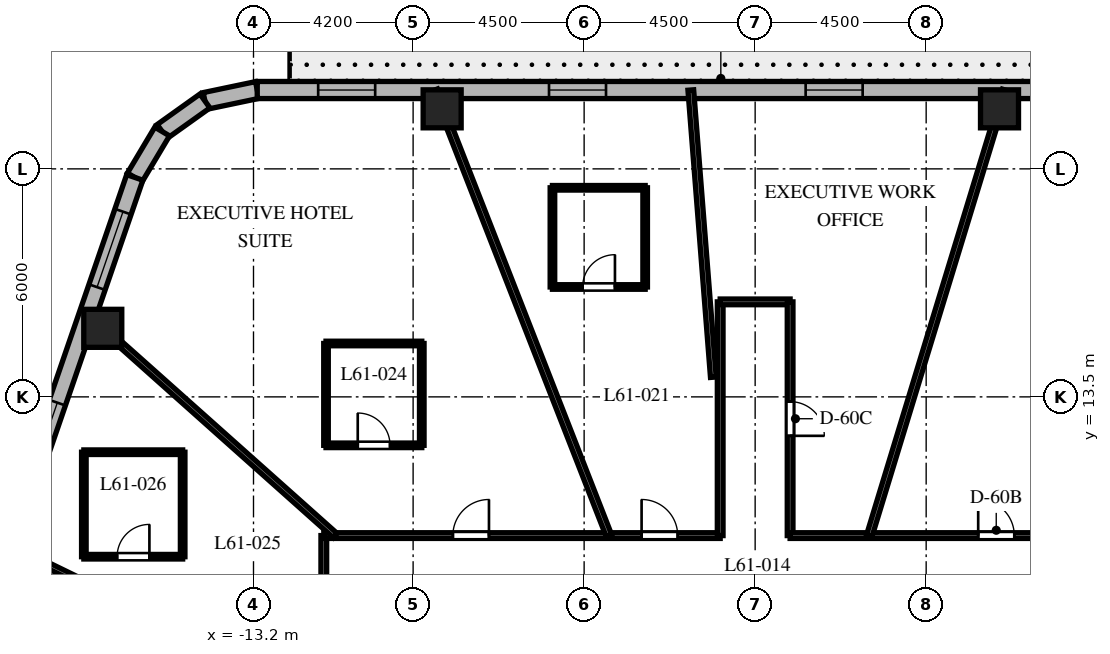
"""IFC4 building model, lengths in metres.
Left out: names, types, materials, properties, quantities, classifications, styles, units other than length and angle.
Written with IfcOpenShell. Run it as: python <this file> out.ifc"""

import sys

from ifc_helpers import new_model, si_unit, direction, frame, frame_2d, origin, origin_2d, place, context, subcontext, project, spatial, rectangle, extrude, element, fill, save


model = new_model("IFC4")
c1 = context("Model", 3, precision=1e-05, world=origin(), true_north=direction((0.0, 1.0)))
c2 = subcontext(c1, "Body", "Model", "MODEL_VIEW")
j1 = project(units=[si_unit("LENGTHUNIT", "METRE"), si_unit("PLANEANGLEUNIT", "RADIAN")], contexts=[c1])
p1 = place(None, origin())
s1 = spatial("IfcSite", under=j1, at=p1, CompositionType="ELEMENT")
p2 = place(p1, origin())
s2 = spatial("IfcBuilding", under=s1, at=p2, CompositionType="ELEMENT")
p3 = place(p2, frame((0.0, 0.0, 244.5)))
s3 = spatial("IfcBuildingStorey", under=s2, at=p3, CompositionType="ELEMENT", Elevation=244.5)
for number, where, z_axis, x_axis in (
    (1, (6.43, 21.08, 0.0), (0.0, 0.0, 1.0), (1.0, 0.0, 0.0)),
    (2, (-8.236, 21.08, 0.0), (0.0, 0.0, 1.0), (1.0, 0.0, 0.0)),
    (3, (-17.166, 15.304, 0.0), (0.0, 0.0, 1.0), (1.0, 0.0, 0.0)),
):
    element("IfcColumn", number, at=place(p3, frame(where, z_axis=z_axis, x_axis=x_axis)), inside=s3, PredefinedType="COLUMN", context=c2, shape_type="SweptSolid", body=[
        extrude(rectangle(XDim=1.0, YDim=1.0, at=origin_2d()), origin(), (0.0, 0.0, 1.0), 3.8),
    ])
p4 = place(p3, frame((-13.102, 21.575, 0.0), z_axis=(0.0, 0.0, 1.0), x_axis=(-0.978757421505, -0.205021730188, 0.0)))
e4 = element("IfcWall", 4, at=p4, inside=s3, PredefinedType="SOLIDWALL", context=c2, shape_type="SweptSolid", body=[
    extrude(rectangle(XDim=1.406, YDim=0.45, at=frame_2d((0.703, 0.0))), origin(), (0.0, 0.0, 1.0), 3.5),
])
p5 = place(p3, frame((-14.478, 21.287, 0.0), z_axis=(0.0, 0.0, 1.0), x_axis=(-0.813888518617, -0.58102106611, 0.0)))
e5 = element("IfcWall", 5, at=p5, inside=s3, PredefinedType="SOLIDWALL", context=c2, shape_type="SweptSolid", body=[
    extrude(rectangle(XDim=1.383, YDim=0.45, at=frame_2d((0.691, 0.0))), origin(), (0.0, 0.0, 1.0), 3.5),
])
p6 = place(p3, frame((-15.604, 20.483, 0.0), z_axis=(0.0, 0.0, 1.0), x_axis=(-0.512222149036, -0.858852996756, 0.0)))
e6 = element("IfcWall", 6, at=p6, inside=s3, PredefinedType="SOLIDWALL", context=c2, shape_type="SweptSolid", body=[
    extrude(rectangle(XDim=1.406, YDim=0.45, at=frame_2d((0.703, 0.0))), origin(), (0.0, 0.0, 1.0), 3.5),
])
p7 = place(p3, frame((11.298, 21.575, 0.0), z_axis=(0.0, 0.0, 1.0), x_axis=(-1.0, 0.0, 0.0)))
e7 = element("IfcWall", 7, at=p7, inside=s3, PredefinedType="SOLIDWALL", context=c2, shape_type="SweptSolid", body=[
    extrude(rectangle(XDim=24.399, YDim=0.45, at=frame_2d((12.2, 0.0))), origin(), (0.0, 0.0, 1.0), 3.5),
])
p8 = place(p7, frame((2.55, 0.0, 0.0)))
e8 = element("IfcOpeningElement", 8, at=p8, cuts=e7, PredefinedType="OPENING", context=c2, shape_type="SweptSolid", body=[
    extrude(rectangle(XDim=0.95, YDim=2.15, at=frame_2d((0.475, 1.075))), frame((0.0, 0.235, 0.0), z_axis=(0.0, -1.0, 0.0), x_axis=(1.0, 0.0, 0.0)), (0.0, 0.0, 1.0), 0.47),
])
p9 = place(p7, frame((8.469, 0.0, 0.8)))
e9 = element("IfcOpeningElement", 9, at=p9, cuts=e7, PredefinedType="OPENING", context=c2, shape_type="SweptSolid", body=[
    extrude(rectangle(XDim=1.5, YDim=1.8, at=frame_2d((0.75, 0.9))), frame((0.0, 0.235, 0.0), z_axis=(0.0, -1.0, 0.0), x_axis=(1.0, 0.0, 0.0)), (0.0, 0.0, 1.0), 0.47),
])
p10 = place(p7, frame((15.222, 0.0, 0.8)))
e10 = element("IfcOpeningElement", 10, at=p10, cuts=e7, PredefinedType="OPENING", context=c2, shape_type="SweptSolid", body=[
    extrude(rectangle(XDim=1.5, YDim=1.8, at=frame_2d((0.75, 0.9))), frame((0.0, 0.235, 0.0), z_axis=(0.0, -1.0, 0.0), x_axis=(1.0, 0.0, 0.0)), (0.0, 0.0, 1.0), 0.47),
])
p11 = place(p7, frame((21.296, 0.0, 0.8)))
e11 = element("IfcOpeningElement", 11, at=p11, cuts=e7, PredefinedType="OPENING", context=c2, shape_type="SweptSolid", body=[
    extrude(rectangle(XDim=1.5, YDim=1.8, at=frame_2d((0.75, 0.9))), frame((0.0, 0.235, 0.0), z_axis=(0.0, -1.0, 0.0), x_axis=(1.0, 0.0, 0.0)), (0.0, 0.0, 1.0), 0.47),
])
p12 = place(p3, frame((-16.324, 19.275, 0.0), z_axis=(0.0, 0.0, 1.0), x_axis=(-0.325083142304, -0.945685439557, 0.0)))
e12 = element("IfcWall", 12, at=p12, inside=s3, PredefinedType="SOLIDWALL", context=c2, shape_type="SweptSolid", body=[
    extrude(rectangle(XDim=20.224, YDim=0.45, at=frame_2d((10.112, 0.0))), origin(), (0.0, 0.0, 1.0), 3.5),
])
p13 = place(p12, frame((0.953, 0.0, 0.8)))
e13 = element("IfcOpeningElement", 13, at=p13, cuts=e12, PredefinedType="OPENING", context=c2, shape_type="SweptSolid", body=[
    extrude(rectangle(XDim=2.1, YDim=1.85, at=frame_2d((1.05, 0.925))), frame((0.0, 0.235, 0.0), z_axis=(0.0, -1.0, 0.0), x_axis=(1.0, 0.0, 0.0)), (0.0, 0.0, 1.0), 0.47),
])
p14 = place(p12, frame((6.268, 0.0, 0.8)))
e14 = element("IfcOpeningElement", 14, at=p14, cuts=e12, PredefinedType="OPENING", context=c2, shape_type="SweptSolid", body=[
    extrude(rectangle(XDim=2.1, YDim=1.85, at=frame_2d((1.05, 0.925))), frame((0.0, 0.235, 0.0), z_axis=(0.0, -1.0, 0.0), x_axis=(1.0, 0.0, 0.0)), (0.0, 0.0, 1.0), 0.47),
])
p15 = place(p12, frame((11.95, 0.0, 0.8)))
e15 = element("IfcOpeningElement", 15, at=p15, cuts=e12, PredefinedType="OPENING", context=c2, shape_type="SweptSolid", body=[
    extrude(rectangle(XDim=2.1, YDim=1.85, at=frame_2d((1.05, 0.925))), frame((0.0, 0.235, 0.0), z_axis=(0.0, -1.0, 0.0), x_axis=(1.0, 0.0, 0.0)), (0.0, 0.0, 1.0), 0.47),
])
p16 = place(p12, frame((17.118, 0.0, 0.8)))
e16 = element("IfcOpeningElement", 16, at=p16, cuts=e12, PredefinedType="OPENING", context=c2, shape_type="SweptSolid", body=[
    extrude(rectangle(XDim=2.1, YDim=1.85, at=frame_2d((1.05, 0.925))), frame((0.0, 0.235, 0.0), z_axis=(0.0, -1.0, 0.0), x_axis=(1.0, 0.0, 0.0)), (0.0, 0.0, 1.0), 0.47),
])
p17 = place(p3, frame((-11.35, 4.4, 0.0), z_axis=(0.0, 0.0, 1.0), x_axis=(0.0, 1.0, 0.0)))
e17 = element("IfcWall", 17, at=p17, inside=s3, PredefinedType="PARTITIONING", context=c2, shape_type="SweptSolid", body=[
    extrude(rectangle(XDim=5.45, YDim=0.15, at=frame_2d((2.725, 0.0))), origin(), (0.0, 0.0, 1.0), 2.99),
])
p18 = place(p17, frame((2.694, 0.0, 0.0)))
e18 = element("IfcOpeningElement", 18, at=p18, cuts=e17, PredefinedType="OPENING", context=c2, shape_type="SweptSolid", body=[
    extrude(rectangle(XDim=0.95, YDim=2.03, at=frame_2d((0.475, 1.015))), frame((0.0, 0.085, 0.0), z_axis=(0.0, -1.0, 0.0), x_axis=(1.0, 0.0, 0.0)), (0.0, 0.0, 1.0), 0.17),
])
p19 = place(p3, frame((-11.35, 9.85, 0.0), z_axis=(0.0, 0.0, 1.0), x_axis=(1.0, 0.0, 0.0)))
e19 = element("IfcWall", 19, at=p19, inside=s3, PredefinedType="PARTITIONING", context=c2, shape_type="SweptSolid", body=[
    extrude(rectangle(XDim=10.43, YDim=0.15, at=frame_2d((5.215, 0.0))), origin(), (0.0, 0.0, 1.0), 2.99),
])
p20 = place(p19, frame((8.362, 0.0, 0.0)))
e20 = element("IfcOpeningElement", 20, at=p20, cuts=e19, PredefinedType="OPENING", context=c2, shape_type="SweptSolid", body=[
    extrude(rectangle(XDim=0.95, YDim=2.03, at=frame_2d((0.475, 1.015))), frame((0.0, 0.085, 0.0), z_axis=(0.0, -1.0, 0.0), x_axis=(1.0, 0.0, 0.0)), (0.0, 0.0, 1.0), 0.17),
])
p21 = place(p19, frame((3.396, 0.0, 0.0)))
e21 = element("IfcOpeningElement", 21, at=p21, cuts=e19, PredefinedType="OPENING", context=c2, shape_type="SweptSolid", body=[
    extrude(rectangle(XDim=0.95, YDim=2.03, at=frame_2d((0.475, 1.015))), frame((0.0, 0.085, 0.0), z_axis=(0.0, -1.0, 0.0), x_axis=(1.0, 0.0, 0.0)), (0.0, 0.0, 1.0), 0.17),
])
p22 = place(p3, frame((-0.92, 9.85, 0.0), z_axis=(0.0, 0.0, 1.0), x_axis=(0.0, 1.0, 0.0)))
e22 = element("IfcWall", 22, at=p22, inside=s3, PredefinedType="PARTITIONING", context=c2, shape_type="SweptSolid", body=[
    extrude(rectangle(XDim=6.15, YDim=0.15, at=frame_2d((3.075, 0.0))), origin(), (0.0, 0.0, 1.0), 3.027),
])
p23 = place(p3, frame((-0.92, 16.0, 0.0), z_axis=(0.0, 0.0, 1.0), x_axis=(1.0, 0.0, 0.0)))
e23 = element("IfcWall", 23, at=p23, inside=s3, PredefinedType="PARTITIONING", context=c2, shape_type="SweptSolid", body=[
    extrude(rectangle(XDim=1.84, YDim=0.15, at=frame_2d((0.92, 0.0))), origin(), (0.0, 0.0, 1.0), 3.5),
])
p24 = place(p3, frame((0.92, 16.0, 0.0), z_axis=(0.0, 0.0, 1.0), x_axis=(0.0, -1.0, 0.0)))
e24 = element("IfcWall", 24, at=p24, inside=s3, PredefinedType="PARTITIONING", context=c2, shape_type="SweptSolid", body=[
    extrude(rectangle(XDim=6.15, YDim=0.15, at=frame_2d((3.075, 0.0))), origin(), (0.0, 0.0, 1.0), 3.027),
])
p25 = place(p24, frame((2.625, 0.0, 0.0)))
e25 = element("IfcOpeningElement", 25, at=p25, cuts=e24, PredefinedType="OPENING", context=c2, shape_type="SweptSolid", body=[
    extrude(rectangle(XDim=0.9, YDim=2.03, at=frame_2d((0.45, 1.015))), frame((0.0, 0.085, 0.0), z_axis=(0.0, -1.0, 0.0), x_axis=(1.0, 0.0, 0.0)), (0.0, 0.0, 1.0), 0.17),
])
p26 = place(p3, frame((0.92, 9.85, 0.0), z_axis=(0.0, 0.0, 1.0), x_axis=(1.0, 0.0, 0.0)))
e26 = element("IfcWall", 26, at=p26, inside=s3, PredefinedType="PARTITIONING", context=c2, shape_type="SweptSolid", body=[
    extrude(rectangle(XDim=10.43, YDim=0.15, at=frame_2d((5.215, 0.0))), origin(), (0.0, 0.0, 1.0), 2.99),
])
p27 = place(p26, frame((4.949, 0.0, 0.0)))
e27 = element("IfcOpeningElement", 27, at=p27, cuts=e26, PredefinedType="OPENING", context=c2, shape_type="SweptSolid", body=[
    extrude(rectangle(XDim=0.95, YDim=2.03, at=frame_2d((0.475, 1.015))), frame((0.0, 0.085, 0.0), z_axis=(0.0, -1.0, 0.0), x_axis=(1.0, 0.0, 0.0)), (0.0, 0.0, 1.0), 0.17),
])
p28 = place(p3, frame((3.004, 9.85, 0.0), z_axis=(0.0, 0.0, 1.0), x_axis=(0.291775760688, 0.956486751333, 0.0)))
e28 = element("IfcWall", 28, at=p28, inside=s3, PredefinedType="PARTITIONING", context=c2, shape_type="SweptSolid", body=[
    extrude(rectangle(XDim=12.258, YDim=0.15, at=frame_2d((6.129, 0.0))), origin(), (0.0, 0.0, 1.0), 2.74),
])
p29 = place(p3, frame((-1.1, 14.018, 0.0), z_axis=(0.0, 0.0, 1.0), x_axis=(-0.078228275349, 0.996935472804, 0.0)))
e29 = element("IfcWall", 29, at=p29, inside=s3, PredefinedType="PARTITIONING", context=c2, shape_type="SweptSolid", body=[
    extrude(rectangle(XDim=7.581, YDim=0.15, at=frame_2d((3.79, 0.0))), origin(), (0.0, 0.0, 1.0), 2.74),
])
p30 = place(p3, frame((-3.848, 9.85, 0.0), z_axis=(0.0, 0.0, 1.0), x_axis=(-0.363921778212, 0.931429513889, 0.0)))
e30 = element("IfcWall", 30, at=p30, inside=s3, PredefinedType="PARTITIONING", context=c2, shape_type="SweptSolid", body=[
    extrude(rectangle(XDim=12.588, YDim=0.15, at=frame_2d((6.294, 0.0))), origin(), (0.0, 0.0, 1.0), 2.74),
])
p31 = place(p3, frame((-11.048, 9.85, 0.0), z_axis=(0.0, 0.0, 1.0), x_axis=(-0.746444434655, 0.665447748492, 0.0)))
e31 = element("IfcWall", 31, at=p31, inside=s3, PredefinedType="PARTITIONING", context=c2, shape_type="SweptSolid", body=[
    extrude(rectangle(XDim=8.732, YDim=0.15, at=frame_2d((4.366, 0.0))), origin(), (0.0, 0.0, 1.0), 2.74),
])
p32 = place(p3, frame((-11.35, 5.528, 0.0), z_axis=(0.0, 0.0, 1.0), x_axis=(-0.899038669565, 0.437869239188, 0.0)))
e32 = element("IfcWall", 32, at=p32, inside=s3, PredefinedType="PARTITIONING", context=c2, shape_type="SweptSolid", body=[
    extrude(rectangle(XDim=9.242, YDim=0.15, at=frame_2d((4.621, 0.0))), origin(), (0.0, 0.0, 1.0), 2.74),
])
p33 = place(p3, frame((-5.334, 16.392, 0.0), z_axis=(0.0, 0.0, 1.0), x_axis=(1.0, 0.0, 0.0)))
e33 = element("IfcWall", 33, at=p33, inside=s3, PredefinedType="PARTITIONING", context=c2, shape_type="SweptSolid", body=[
    extrude(rectangle(XDim=2.44, YDim=0.12, at=frame_2d((1.22, 0.0))), origin(), (0.0, 0.0, 1.0), 3.5),
])
p34 = place(p33, frame((0.795, 0.0, 0.0)))
e34 = element("IfcOpeningElement", 34, at=p34, cuts=e33, PredefinedType="OPENING", context=c2, shape_type="SweptSolid", body=[
    extrude(rectangle(XDim=0.85, YDim=2.03, at=frame_2d((0.425, 1.015))), frame((0.0, 0.07, 0.0), z_axis=(0.0, -1.0, 0.0), x_axis=(1.0, 0.0, 0.0)), (0.0, 0.0, 1.0), 0.14),
])
p35 = place(p3, frame((-2.894, 16.392, 0.0), z_axis=(0.0, 0.0, 1.0), x_axis=(0.0, 1.0, 0.0)))
e35 = element("IfcWall", 35, at=p35, inside=s3, PredefinedType="PARTITIONING", context=c2, shape_type="SweptSolid", body=[
    extrude(rectangle(XDim=2.61, YDim=0.12, at=frame_2d((1.305, 0.0))), origin(), (0.0, 0.0, 1.0), 2.94),
])
p36 = place(p3, frame((-2.894, 19.002, 0.0), z_axis=(0.0, 0.0, 1.0), x_axis=(-1.0, 0.0, 0.0)))
e36 = element("IfcWall", 36, at=p36, inside=s3, PredefinedType="PARTITIONING", context=c2, shape_type="SweptSolid", body=[
    extrude(rectangle(XDim=2.44, YDim=0.12, at=frame_2d((1.22, 0.0))), origin(), (0.0, 0.0, 1.0), 3.5),
])
p37 = place(p3, frame((-5.334, 19.002, 0.0), z_axis=(0.0, 0.0, 1.0), x_axis=(0.0, -1.0, 0.0)))
e37 = element("IfcWall", 37, at=p37, inside=s3, PredefinedType="PARTITIONING", context=c2, shape_type="SweptSolid", body=[
    extrude(rectangle(XDim=2.61, YDim=0.12, at=frame_2d((1.305, 0.0))), origin(), (0.0, 0.0, 1.0), 2.94),
])
p38 = place(p3, frame((-11.292, 12.225, 0.0), z_axis=(0.0, 0.0, 1.0), x_axis=(1.0, 0.0, 0.0)))
e38 = element("IfcWall", 38, at=p38, inside=s3, PredefinedType="PARTITIONING", context=c2, shape_type="SweptSolid", body=[
    extrude(rectangle(XDim=2.52, YDim=0.12, at=frame_2d((1.26, 0.0))), origin(), (0.0, 0.0, 1.0), 2.99),
])
p39 = place(p38, frame((0.835, 0.0, 0.0)))
e39 = element("IfcOpeningElement", 39, at=p39, cuts=e38, PredefinedType="OPENING", context=c2, shape_type="SweptSolid", body=[
    extrude(rectangle(XDim=0.85, YDim=2.03, at=frame_2d((0.425, 1.015))), frame((0.0, 0.07, 0.0), z_axis=(0.0, -1.0, 0.0), x_axis=(1.0, 0.0, 0.0)), (0.0, 0.0, 1.0), 0.14),
])
p40 = place(p3, frame((-8.772, 12.225, 0.0), z_axis=(0.0, 0.0, 1.0), x_axis=(0.0, 1.0, 0.0)))
e40 = element("IfcWall", 40, at=p40, inside=s3, PredefinedType="PARTITIONING", context=c2, shape_type="SweptSolid", body=[
    extrude(rectangle(XDim=2.68, YDim=0.12, at=frame_2d((1.34, 0.0))), origin(), (0.0, 0.0, 1.0), 2.99),
])
p41 = place(p3, frame((-8.772, 14.905, 0.0), z_axis=(0.0, 0.0, 1.0), x_axis=(-1.0, 0.0, 0.0)))
e41 = element("IfcWall", 41, at=p41, inside=s3, PredefinedType="PARTITIONING", context=c2, shape_type="SweptSolid", body=[
    extrude(rectangle(XDim=2.52, YDim=0.12, at=frame_2d((1.26, 0.0))), origin(), (0.0, 0.0, 1.0), 3.027),
])
p42 = place(p3, frame((-11.292, 14.905, 0.0), z_axis=(0.0, 0.0, 1.0), x_axis=(0.0, -1.0, 0.0)))
e42 = element("IfcWall", 42, at=p42, inside=s3, PredefinedType="PARTITIONING", context=c2, shape_type="SweptSolid", body=[
    extrude(rectangle(XDim=2.68, YDim=0.12, at=frame_2d((1.34, 0.0))), origin(), (0.0, 0.0, 1.0), 3.027),
])
p43 = place(p3, frame((-17.664, 9.294, 0.0), z_axis=(0.0, 0.0, 1.0), x_axis=(1.0, 0.0, 0.0)))
e43 = element("IfcWall", 43, at=p43, inside=s3, PredefinedType="PARTITIONING", context=c2, shape_type="SweptSolid", body=[
    extrude(rectangle(XDim=2.6, YDim=0.12, at=frame_2d((1.3, 0.0))), origin(), (0.0, 0.0, 1.0), 3.073),
])
p44 = place(p43, frame((0.875, 0.0, 0.0)))
e44 = element("IfcOpeningElement", 44, at=p44, cuts=e43, PredefinedType="OPENING", context=c2, shape_type="SweptSolid", body=[
    extrude(rectangle(XDim=0.85, YDim=2.03, at=frame_2d((0.425, 1.015))), frame((0.0, 0.07, 0.0), z_axis=(0.0, -1.0, 0.0), x_axis=(1.0, 0.0, 0.0)), (0.0, 0.0, 1.0), 0.14),
])
p45 = place(p3, frame((-15.064, 9.294, 0.0), z_axis=(0.0, 0.0, 1.0), x_axis=(0.0, 1.0, 0.0)))
e45 = element("IfcWall", 45, at=p45, inside=s3, PredefinedType="PARTITIONING", context=c2, shape_type="SweptSolid", body=[
    extrude(rectangle(XDim=2.75, YDim=0.12, at=frame_2d((1.375, 0.0))), origin(), (0.0, 0.0, 1.0), 3.073),
])
p46 = place(p3, frame((-15.064, 12.044, 0.0), z_axis=(0.0, 0.0, 1.0), x_axis=(-1.0, 0.0, 0.0)))
e46 = element("IfcWall", 46, at=p46, inside=s3, PredefinedType="PARTITIONING", context=c2, shape_type="SweptSolid", body=[
    extrude(rectangle(XDim=2.6, YDim=0.12, at=frame_2d((1.3, 0.0))), origin(), (0.0, 0.0, 1.0), 3.5),
])
p47 = place(p3, frame((-17.664, 12.044, 0.0), z_axis=(0.0, 0.0, 1.0), x_axis=(0.0, -1.0, 0.0)))
e47 = element("IfcWall", 47, at=p47, inside=s3, PredefinedType="PARTITIONING", context=c2, shape_type="SweptSolid", body=[
    extrude(rectangle(XDim=2.75, YDim=0.12, at=frame_2d((1.375, 0.0))), origin(), (0.0, 0.0, 1.0), 3.5),
])
p48 = place(p9, origin())
e48 = element("IfcWindow", 48, at=p48, inside=s3, PartitioningType="SINGLE_PANEL", PredefinedType="WINDOW", context=c2, shape_type="SweptSolid", body=[
    extrude(rectangle(XDim=1.5, YDim=1.8, at=frame_2d((0.75, 0.9))), frame((0.0, 0.03, 0.0), z_axis=(0.0, -1.0, 0.0), x_axis=(1.0, 0.0, 0.0)), (0.0, 0.0, 1.0), 0.06),
])
fill(e9, e48)
p49 = place(p10, origin())
e49 = element("IfcWindow", 49, at=p49, inside=s3, PartitioningType="SINGLE_PANEL", PredefinedType="WINDOW", context=c2, shape_type="SweptSolid", body=[
    extrude(rectangle(XDim=1.5, YDim=1.8, at=frame_2d((0.75, 0.9))), frame((0.0, 0.03, 0.0), z_axis=(0.0, -1.0, 0.0), x_axis=(1.0, 0.0, 0.0)), (0.0, 0.0, 1.0), 0.06),
])
fill(e10, e49)
p50 = place(p11, origin())
e50 = element("IfcWindow", 50, at=p50, inside=s3, PartitioningType="SINGLE_PANEL", PredefinedType="WINDOW", context=c2, shape_type="SweptSolid", body=[
    extrude(rectangle(XDim=1.5, YDim=1.8, at=frame_2d((0.75, 0.9))), frame((0.0, 0.03, 0.0), z_axis=(0.0, -1.0, 0.0), x_axis=(1.0, 0.0, 0.0)), (0.0, 0.0, 1.0), 0.06),
])
fill(e11, e50)
p51 = place(p13, origin())
e51 = element("IfcWindow", 51, at=p51, inside=s3, PartitioningType="SINGLE_PANEL", PredefinedType="WINDOW", context=c2, shape_type="SweptSolid", body=[
    extrude(rectangle(XDim=2.1, YDim=1.85, at=frame_2d((1.05, 0.925))), frame((0.0, 0.03, 0.0), z_axis=(0.0, -1.0, 0.0), x_axis=(1.0, 0.0, 0.0)), (0.0, 0.0, 1.0), 0.06),
])
fill(e13, e51)
p52 = place(p14, origin())
e52 = element("IfcWindow", 52, at=p52, inside=s3, PartitioningType="SINGLE_PANEL", PredefinedType="WINDOW", context=c2, shape_type="SweptSolid", body=[
    extrude(rectangle(XDim=2.1, YDim=1.85, at=frame_2d((1.05, 0.925))), frame((0.0, 0.03, 0.0), z_axis=(0.0, -1.0, 0.0), x_axis=(1.0, 0.0, 0.0)), (0.0, 0.0, 1.0), 0.06),
])
fill(e14, e52)
p53 = place(p27, origin())
e53 = element("IfcDoor", 53, at=p53, inside=s3, OperationType="SINGLE_SWING_LEFT", PredefinedType="DOOR", context=c2, shape_type="SweptSolid", body=[
    extrude(rectangle(XDim=0.95, YDim=2.03, at=frame_2d((0.475, 1.015))), frame((0.0, 0.025, 0.0), z_axis=(0.0, -1.0, 0.0), x_axis=(1.0, 0.0, 0.0)), (0.0, 0.0, 1.0), 0.05),
])
fill(e27, e53)
p54 = place(p25, origin())
e54 = element("IfcDoor", 54, at=p54, inside=s3, OperationType="SINGLE_SWING_RIGHT", PredefinedType="DOOR", context=c2, shape_type="SweptSolid", body=[
    extrude(rectangle(XDim=0.9, YDim=2.03, at=frame_2d((0.45, 1.015))), frame((0.0, 0.025, 0.0), z_axis=(0.0, -1.0, 0.0), x_axis=(1.0, 0.0, 0.0)), (0.0, 0.0, 1.0), 0.05),
])
fill(e25, e54)
p55 = place(p20, origin())
e55 = element("IfcDoor", 55, at=p55, inside=s3, OperationType="SINGLE_SWING_LEFT", PredefinedType="DOOR", context=c2, shape_type="SweptSolid", body=[
    extrude(rectangle(XDim=0.95, YDim=2.03, at=frame_2d((0.475, 1.015))), frame((0.0, 0.025, 0.0), z_axis=(0.0, -1.0, 0.0), x_axis=(1.0, 0.0, 0.0)), (0.0, 0.0, 1.0), 0.05),
])
fill(e20, e55)
p56 = place(p34, origin())
e56 = element("IfcDoor", 56, at=p56, inside=s3, OperationType="SINGLE_SWING_RIGHT", PredefinedType="DOOR", context=c2, shape_type="SweptSolid", body=[
    extrude(rectangle(XDim=0.85, YDim=2.03, at=frame_2d((0.425, 1.015))), frame((0.0, 0.025, 0.0), z_axis=(0.0, -1.0, 0.0), x_axis=(1.0, 0.0, 0.0)), (0.0, 0.0, 1.0), 0.05),
])
fill(e34, e56)
p57 = place(p21, origin())
e57 = element("IfcDoor", 57, at=p57, inside=s3, OperationType="SINGLE_SWING_RIGHT", PredefinedType="DOOR", context=c2, shape_type="SweptSolid", body=[
    extrude(rectangle(XDim=0.95, YDim=2.03, at=frame_2d((0.475, 1.015))), frame((0.0, 0.025, 0.0), z_axis=(0.0, -1.0, 0.0), x_axis=(1.0, 0.0, 0.0)), (0.0, 0.0, 1.0), 0.05),
])
fill(e21, e57)
p58 = place(p39, origin())
e58 = element("IfcDoor", 58, at=p58, inside=s3, OperationType="SINGLE_SWING_LEFT", PredefinedType="DOOR", context=c2, shape_type="SweptSolid", body=[
    extrude(rectangle(XDim=0.85, YDim=2.03, at=frame_2d((0.425, 1.015))), frame((0.0, 0.025, 0.0), z_axis=(0.0, -1.0, 0.0), x_axis=(1.0, 0.0, 0.0)), (0.0, 0.0, 1.0), 0.05),
])
fill(e39, e58)
p59 = place(p44, origin())
e59 = element("IfcDoor", 59, at=p59, inside=s3, OperationType="SINGLE_SWING_RIGHT", PredefinedType="DOOR", context=c2, shape_type="SweptSolid", body=[
    extrude(rectangle(XDim=0.85, YDim=2.03, at=frame_2d((0.425, 1.015))), frame((0.0, 0.025, 0.0), z_axis=(0.0, -1.0, 0.0), x_axis=(1.0, 0.0, 0.0)), (0.0, 0.0, 1.0), 0.05),
])
fill(e44, e59)
save(model, sys.argv[1])
